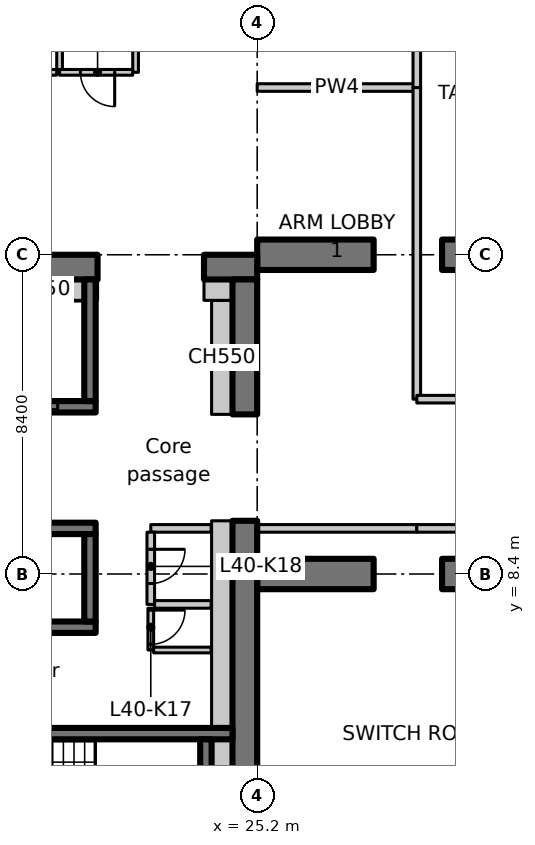
"""IFC4 building model, lengths in metres.
Left out: names, types, materials, properties, quantities, classifications, styles, units other than length and angle.
Written with IfcOpenShell. Run it as: python <this file> out.ifc"""

import sys

from ifc_helpers import new_model, si_unit, direction, frame, frame_2d, origin, place, context, subcontext, project, spatial, polyline, rectangle, outline, extrude, element, fill, save


model = new_model("IFC4")
c1 = context("Model", 3, precision=1e-05, world=origin(), true_north=direction((0.0, 1.0)))
c2 = subcontext(c1, "Body", "Model", "MODEL_VIEW")
j1 = project(units=[si_unit("LENGTHUNIT", "METRE"), si_unit("PLANEANGLEUNIT", "RADIAN")], contexts=[c1])
p1 = place(None, origin())
s1 = spatial("IfcSite", under=j1, at=p1, CompositionType="ELEMENT")
p2 = place(p1, origin())
s2 = spatial("IfcBuilding", under=s1, at=p2, CompositionType="ELEMENT")
p3 = place(p2, frame((0.0, 0.0, 162.0)))
s3 = spatial("IfcBuildingStorey", under=s2, at=p3, CompositionType="ELEMENT", Elevation=162.0)
for number, where, z_axis, x_axis in (
    (1, (25.2, 8.4, 0.0), (0.0, 0.0, 1.0), (1.0, 0.0, 0.0)),
    (2, (30.065, 8.4, 0.0), (0.0, 0.0, 1.0), (1.0, 0.0, 0.0)),
    (3, (25.2, 16.8, 0.0), (0.0, 0.0, 1.0), (1.0, 0.0, 0.0)),
    (4, (30.065, 16.8, 0.0), (0.0, 0.0, 1.0), (1.0, 0.0, 0.0)),
):
    element("IfcWall", number, at=place(p3, frame(where, z_axis=z_axis, x_axis=x_axis)), inside=s3, PredefinedType="SHEAR", context=c2, shape_type="SweptSolid", body=[
        extrude(rectangle(XDim=3.065, YDim=0.8, at=frame_2d((1.532, 0.0))), origin(), (0.0, 0.0, 1.0), 4.55),
    ])
p4 = place(p3, frame((-1.1, 16.475, 0.0), z_axis=(0.0, 0.0, 1.0), x_axis=(1.0, 0.0, 0.0)))
e5 = element("IfcWall", 5, at=p4, inside=s3, PredefinedType="SHEAR", context=c2, shape_type="SweptSolid", body=[
    extrude(rectangle(XDim=22.1, YDim=0.65, at=frame_2d((11.05, 0.0))), origin(), (0.0, 0.0, 1.0), 4.55),
])
p5 = place(p4, frame((3.15, 0.0, 0.0)))
e6 = element("IfcOpeningElement", 6, at=p5, cuts=e5, PredefinedType="OPENING", context=c2, shape_type="SweptSolid", body=[
    extrude(rectangle(XDim=1.1, YDim=2.3, at=frame_2d((0.55, 1.15))), frame((0.0, 0.335, 0.0), z_axis=(0.0, -1.0, 0.0), x_axis=(1.0, 0.0, 0.0)), (0.0, 0.0, 1.0), 0.67),
])
p6 = place(p3, frame((23.8, 16.475, 0.0), z_axis=(0.0, 0.0, 1.0), x_axis=(1.0, 0.0, 0.0)))
e7 = element("IfcWall", 7, at=p6, inside=s3, PredefinedType="SHEAR", context=c2, shape_type="SweptSolid", body=[
    extrude(rectangle(XDim=1.4, YDim=0.65, at=frame_2d((0.7, 0.0))), origin(), (0.0, 0.0, 1.0), 4.55),
])
p7 = place(p3, frame((24.875, 0.65, 0.0), z_axis=(0.0, 0.0, 1.0), x_axis=(0.0, 1.0, 0.0)))
e8 = element("IfcWall", 8, at=p7, inside=s3, PredefinedType="SHEAR", context=c2, shape_type="SweptSolid", body=[
    extrude(rectangle(XDim=9.15, YDim=0.65, at=frame_2d((4.575, 0.0))), origin(), (0.0, 0.0, 1.0), 4.55),
])
p8 = place(p3, frame((24.875, 12.6, 0.0), z_axis=(0.0, 0.0, 1.0), x_axis=(0.0, 1.0, 0.0)))
e9 = element("IfcWall", 9, at=p8, inside=s3, PredefinedType="SHEAR", context=c2, shape_type="SweptSolid", body=[
    extrude(rectangle(XDim=3.55, YDim=0.65, at=frame_2d((1.775, 0.0))), origin(), (0.0, 0.0, 1.0), 4.55),
])
p9 = place(p3, frame((24.275, 12.6, 0.0), z_axis=(0.0, 0.0, 1.0), x_axis=(0.0, 1.0, 0.0)))
e10 = element("IfcWall", 10, at=p9, inside=s3, PredefinedType="PARTITIONING", context=c2, shape_type="SweptSolid", body=[
    extrude(rectangle(XDim=3.0, YDim=0.55, at=frame_2d((1.5, 0.0))), origin(), (0.0, 0.0, 1.0), 4.55),
])
p10 = place(p3, frame((23.8, 15.875, 0.0), z_axis=(0.0, 0.0, 1.0), x_axis=(1.0, 0.0, 0.0)))
e11 = element("IfcWall", 11, at=p10, inside=s3, PredefinedType="PARTITIONING", context=c2, shape_type="SweptSolid", body=[
    extrude(rectangle(XDim=0.75, YDim=0.55, at=frame_2d((0.375, 0.0))), origin(), (0.0, 0.0, 1.0), 4.55),
])
for number, where, z_axis, x_axis in (
    (12, (0.65, 7.0, 0.0), (0.0, 0.0, 1.0), (1.0, 0.0, 0.0)),
    (13, (0.65, 9.6, 0.0), (0.0, 0.0, 1.0), (1.0, 0.0, 0.0)),
):
    element("IfcWall", number, at=place(p3, frame(where, z_axis=z_axis, x_axis=x_axis)), inside=s3, PredefinedType="SHEAR", context=c2, shape_type="SweptSolid", body=[
        extrude(rectangle(XDim=20.3, YDim=0.3, at=frame_2d((10.15, 0.0))), origin(), (0.0, 0.0, 1.0), 4.55),
    ])
p11 = place(p3, frame((20.8, 7.15, 0.0), z_axis=(0.0, 0.0, 1.0), x_axis=(0.0, 1.0, 0.0)))
e14 = element("IfcWall", 14, at=p11, inside=s3, PredefinedType="SHEAR", context=c2, shape_type="SweptSolid", body=[
    extrude(rectangle(XDim=2.3, YDim=0.3, at=frame_2d((1.15, 0.0))), origin(), (0.0, 0.0, 1.0), 4.55),
])
p12 = place(p3, frame((0.65, 12.8, 0.0), z_axis=(0.0, 0.0, 1.0), x_axis=(1.0, 0.0, 0.0)))
e15 = element("IfcWall", 15, at=p12, inside=s3, PredefinedType="SHEAR", context=c2, shape_type="SweptSolid", body=[
    extrude(rectangle(XDim=20.3, YDim=0.3, at=frame_2d((10.15, 0.0))), origin(), (0.0, 0.0, 1.0), 4.55),
])
p13 = place(p12, frame((4.2, 0.0, 0.0)))
e16 = element("IfcOpeningElement", 16, at=p13, cuts=e15, PredefinedType="OPENING", context=c2, shape_type="SweptSolid", body=[
    extrude(rectangle(XDim=1.1, YDim=2.3, at=frame_2d((0.55, 1.15))), frame((0.0, 0.16, 0.0), z_axis=(0.0, -1.0, 0.0), x_axis=(1.0, 0.0, 0.0)), (0.0, 0.0, 1.0), 0.32),
])
p14 = place(p12, frame((7.0, 0.0, 0.0)))
e17 = element("IfcOpeningElement", 17, at=p14, cuts=e15, PredefinedType="OPENING", context=c2, shape_type="SweptSolid", body=[
    extrude(rectangle(XDim=1.1, YDim=2.3, at=frame_2d((0.55, 1.15))), frame((0.0, 0.16, 0.0), z_axis=(0.0, -1.0, 0.0), x_axis=(1.0, 0.0, 0.0)), (0.0, 0.0, 1.0), 0.32),
])
p15 = place(p12, frame((9.8, 0.0, 0.0)))
e18 = element("IfcOpeningElement", 18, at=p15, cuts=e15, PredefinedType="OPENING", context=c2, shape_type="SweptSolid", body=[
    extrude(rectangle(XDim=1.1, YDim=2.3, at=frame_2d((0.55, 1.15))), frame((0.0, 0.16, 0.0), z_axis=(0.0, -1.0, 0.0), x_axis=(1.0, 0.0, 0.0)), (0.0, 0.0, 1.0), 0.32),
])
p16 = place(p12, frame((12.6, 0.0, 0.0)))
e19 = element("IfcOpeningElement", 19, at=p16, cuts=e15, PredefinedType="OPENING", context=c2, shape_type="SweptSolid", body=[
    extrude(rectangle(XDim=1.1, YDim=2.3, at=frame_2d((0.55, 1.15))), frame((0.0, 0.16, 0.0), z_axis=(0.0, -1.0, 0.0), x_axis=(1.0, 0.0, 0.0)), (0.0, 0.0, 1.0), 0.32),
])
p17 = place(p12, frame((18.2, 0.0, 0.0)))
e20 = element("IfcOpeningElement", 20, at=p17, cuts=e15, PredefinedType="OPENING", context=c2, shape_type="SweptSolid", body=[
    extrude(rectangle(XDim=1.1, YDim=2.3, at=frame_2d((0.55, 1.15))), frame((0.0, 0.16, 0.0), z_axis=(0.0, -1.0, 0.0), x_axis=(1.0, 0.0, 0.0)), (0.0, 0.0, 1.0), 0.32),
])
p18 = place(p3, frame((20.8, 12.95, 0.0), z_axis=(0.0, 0.0, 1.0), x_axis=(0.0, 1.0, 0.0)))
e21 = element("IfcWall", 21, at=p18, inside=s3, PredefinedType="SHEAR", context=c2, shape_type="SweptSolid", body=[
    extrude(rectangle(XDim=3.2, YDim=0.3, at=frame_2d((1.6, 0.0))), origin(), (0.0, 0.0, 1.0), 4.55),
])
p19 = place(p3, frame((15.8, 4.2, 0.0), z_axis=(0.0, 0.0, 1.0), x_axis=(1.0, 0.0, 0.0)))
e22 = element("IfcWall", 22, at=p19, inside=s3, PredefinedType="SHEAR", context=c2, shape_type="SweptSolid", body=[
    extrude(rectangle(XDim=8.75, YDim=0.3, at=frame_2d((4.375, 0.0))), origin(), (0.0, 0.0, 1.0), 4.55),
])
p20 = place(p19, frame((0.4, 0.0, 0.0)))
e23 = element("IfcOpeningElement", 23, at=p20, cuts=e22, PredefinedType="OPENING", context=c2, shape_type="SweptSolid", body=[
    extrude(rectangle(XDim=1.0, YDim=2.1, at=frame_2d((0.5, 1.05))), frame((0.0, 0.16, 0.0), z_axis=(0.0, -1.0, 0.0), x_axis=(1.0, 0.0, 0.0)), (0.0, 0.0, 1.0), 0.32),
])
p21 = place(p3, frame((23.85, 1.5, 0.0), z_axis=(0.0, 0.0, 1.0), x_axis=(0.0, 1.0, 0.0)))
e24 = element("IfcWall", 24, at=p21, inside=s3, PredefinedType="SHEAR", context=c2, shape_type="SweptSolid", body=[
    extrude(rectangle(XDim=2.55, YDim=0.3, at=frame_2d((1.275, 0.0))), origin(), (0.0, 0.0, 1.0), 4.55),
])
p22 = place(p3, frame((23.988, 9.6, 0.0), z_axis=(0.0, 0.0, 1.0), x_axis=(-1.0, 0.0, 0.0)))
e25 = element("IfcWall", 25, at=p22, inside=s3, PredefinedType="PARTITIONING", context=c2, shape_type="SweptSolid", body=[
    extrude(rectangle(XDim=1.588, YDim=0.2, at=frame_2d((0.794, 0.0))), origin(), (0.0, 0.0, 1.0), 4.55),
])
p23 = place(p3, frame((22.4, 9.5, 0.0), z_axis=(0.0, 0.0, 1.0), x_axis=(0.0, -1.0, 0.0)))
e26 = element("IfcWall", 26, at=p23, inside=s3, PredefinedType="PARTITIONING", context=c2, shape_type="SweptSolid", body=[
    extrude(rectangle(XDim=1.9, YDim=0.2, at=frame_2d((0.95, 0.0))), origin(), (0.0, 0.0, 1.0), 4.55),
])
p24 = place(p23, frame((0.45, 0.0, 0.0)))
e27 = element("IfcOpeningElement", 27, at=p24, cuts=e26, PredefinedType="OPENING", context=c2, shape_type="SweptSolid", body=[
    extrude(rectangle(XDim=0.9, YDim=2.1, at=frame_2d((0.45, 1.05))), frame((0.0, 0.11, 0.0), z_axis=(0.0, -1.0, 0.0), x_axis=(1.0, 0.0, 0.0)), (0.0, 0.0, 1.0), 0.22),
])
p25 = place(p3, frame((22.5, 7.6, 0.0), z_axis=(0.0, 0.0, 1.0), x_axis=(1.0, 0.0, 0.0)))
e28 = element("IfcWall", 28, at=p25, inside=s3, PredefinedType="PARTITIONING", context=c2, shape_type="SweptSolid", body=[
    extrude(rectangle(XDim=1.488, YDim=0.2, at=frame_2d((0.744, 0.0))), origin(), (0.0, 0.0, 1.0), 4.55),
])
p26 = place(p3, frame((22.0, 23.925, 0.0), z_axis=(0.0, 0.0, 1.0), x_axis=(0.0, -1.0, 0.0)))
e29 = element("IfcWall", 29, at=p26, inside=s3, PredefinedType="PARTITIONING", context=c2, shape_type="SweptSolid", body=[
    extrude(rectangle(XDim=2.325, YDim=0.15, at=frame_2d((1.163, 0.0))), origin(), (0.0, 0.0, 1.0), 4.55),
])
p27 = place(p3, frame((21.925, 21.6, 0.0), z_axis=(0.0, 0.0, 1.0), x_axis=(-1.0, 0.0, 0.0)))
e30 = element("IfcWall", 30, at=p27, inside=s3, PredefinedType="PARTITIONING", context=c2, shape_type="SweptSolid", body=[
    extrude(rectangle(XDim=1.925, YDim=0.15, at=frame_2d((0.962, 0.0))), origin(), (0.0, 0.0, 1.0), 4.55),
])
p28 = place(p27, frame((0.475, 0.0, 0.0)))
e31 = element("IfcOpeningElement", 31, at=p28, cuts=e30, PredefinedType="OPENING", context=c2, shape_type="SweptSolid", body=[
    extrude(rectangle(XDim=0.9, YDim=2.1, at=frame_2d((0.45, 1.05))), frame((0.0, 0.085, 0.0), z_axis=(0.0, -1.0, 0.0), x_axis=(1.0, 0.0, 0.0)), (0.0, 0.0, 1.0), 0.17),
])
p29 = place(p3, frame((20.0, 21.675, 0.0), z_axis=(0.0, 0.0, 1.0), x_axis=(0.0, 1.0, 0.0)))
e32 = element("IfcWall", 32, at=p29, inside=s3, PredefinedType="PARTITIONING", context=c2, shape_type="SweptSolid", body=[
    extrude(rectangle(XDim=2.25, YDim=0.15, at=frame_2d((1.125, 0.0))), origin(), (0.0, 0.0, 1.0), 4.55),
])
p30 = place(p3, frame((19.925, 21.6, 0.0), z_axis=(0.0, 0.0, 1.0), x_axis=(-1.0, 0.0, 0.0)))
e33 = element("IfcWall", 33, at=p30, inside=s3, PredefinedType="PARTITIONING", context=c2, shape_type="SweptSolid", body=[
    extrude(rectangle(XDim=2.325, YDim=0.15, at=frame_2d((1.163, 0.0))), origin(), (0.0, 0.0, 1.0), 4.55),
])
p31 = place(p30, frame((0.675, 0.0, 0.0)))
e34 = element("IfcOpeningElement", 34, at=p31, cuts=e33, PredefinedType="OPENING", context=c2, shape_type="SweptSolid", body=[
    extrude(rectangle(XDim=0.9, YDim=2.1, at=frame_2d((0.45, 1.05))), frame((0.0, 0.085, 0.0), z_axis=(0.0, -1.0, 0.0), x_axis=(1.0, 0.0, 0.0)), (0.0, 0.0, 1.0), 0.17),
])
p32 = place(p3, frame((22.4, 7.5, 0.0), z_axis=(0.0, 0.0, 1.0), x_axis=(0.0, -1.0, 0.0)))
e35 = element("IfcWall", 35, at=p32, inside=s3, PredefinedType="PARTITIONING", context=c2, shape_type="SweptSolid", body=[
    extrude(rectangle(XDim=1.1, YDim=0.15, at=frame_2d((0.55, 0.0))), origin(), (0.0, 0.0, 1.0), 4.55),
])
p33 = place(p32, frame((0.05, 0.0, 0.0)))
e36 = element("IfcOpeningElement", 36, at=p33, cuts=e35, PredefinedType="OPENING", context=c2, shape_type="SweptSolid", body=[
    extrude(rectangle(XDim=0.9, YDim=2.1, at=frame_2d((0.45, 1.05))), frame((0.0, 0.085, 0.0), z_axis=(0.0, -1.0, 0.0), x_axis=(1.0, 0.0, 0.0)), (0.0, 0.0, 1.0), 0.17),
])
p34 = place(p3, frame((22.475, 6.4, 0.0), z_axis=(0.0, 0.0, 1.0), x_axis=(1.0, 0.0, 0.0)))
e37 = element("IfcWall", 37, at=p34, inside=s3, PredefinedType="PARTITIONING", context=c2, shape_type="SweptSolid", body=[
    extrude(rectangle(XDim=1.513, YDim=0.15, at=frame_2d((0.756, 0.0))), origin(), (0.0, 0.0, 1.0), 4.55),
])
p35 = place(p3, frame((18.15, 15.875, 0.0), z_axis=(0.0, 0.0, 1.0), x_axis=(1.0, 0.0, 0.0)))
e38 = element("IfcWall", 38, at=p35, inside=s3, PredefinedType="PARTITIONING", context=c2, shape_type="SweptSolid", body=[
    extrude(rectangle(XDim=2.5, YDim=0.55, at=frame_2d((1.25, 0.0))), origin(), (0.0, 0.0, 1.0), 4.55),
])
p36 = place(p3, frame((20.95, 15.875, 0.0), z_axis=(0.0, 0.0, 1.0), x_axis=(1.0, 0.0, 0.0)))
e39 = element("IfcWall", 39, at=p36, inside=s3, PredefinedType="PARTITIONING", context=c2, shape_type="SweptSolid", body=[
    extrude(rectangle(XDim=0.05, YDim=0.55, at=frame_2d((0.025, 0.0))), origin(), (0.0, 0.0, 1.0), 4.55),
])
p37 = place(p3, frame((24.275, 1.5, 0.0), z_axis=(0.0, 0.0, 1.0), x_axis=(0.0, 1.0, 0.0)))
e40 = element("IfcWall", 40, at=p37, inside=s3, PredefinedType="PARTITIONING", context=c2, shape_type="SweptSolid", body=[
    extrude(rectangle(XDim=2.55, YDim=0.55, at=frame_2d((1.275, 0.0))), origin(), (0.0, 0.0, 1.0), 4.55),
])
p38 = place(p3, frame((24.275, 4.35, 0.0), z_axis=(0.0, 0.0, 1.0), x_axis=(0.0, 1.0, 0.0)))
e41 = element("IfcWall", 41, at=p38, inside=s3, PredefinedType="PARTITIONING", context=c2, shape_type="SweptSolid", body=[
    extrude(rectangle(XDim=5.45, YDim=0.55, at=frame_2d((2.725, 0.0))), origin(), (0.0, 0.0, 1.0), 4.55),
])
for number, where, z_axis, x_axis in (
    (42, (25.2, 21.2, 0.0), (0.0, 0.0, 1.0), (1.0, 0.0, 0.0)),
    (43, (29.4, 9.6, 0.0), (0.0, 0.0, 1.0), (-1.0, 0.0, 0.0)),
):
    element("IfcWall", number, at=place(p3, frame(where, z_axis=z_axis, x_axis=x_axis)), inside=s3, PredefinedType="PARTITIONING", context=c2, shape_type="SweptSolid", body=[
        extrude(rectangle(XDim=4.2, YDim=0.2, at=frame_2d((2.1, 0.0))), origin(), (0.0, 0.0, 1.0), 4.53),
    ])
p39 = place(p3, frame((29.4, 21.2, 0.0), z_axis=(0.0, 0.0, 1.0), x_axis=(0.0, -1.0, 0.0)))
e44 = element("IfcWall", 44, at=p39, inside=s3, PredefinedType="PARTITIONING", context=c2, shape_type="SweptSolid", body=[
    extrude(rectangle(XDim=8.2, YDim=0.2, at=frame_2d((4.1, 0.0))), origin(), (0.0, 0.0, 1.0), 4.53),
])
p40 = place(p3, frame((29.4, 27.436, 0.0), z_axis=(0.0, 0.0, 1.0), x_axis=(0.0, -1.0, 0.0)))
e45 = element("IfcWall", 45, at=p40, inside=s3, PredefinedType="PARTITIONING", context=c2, shape_type="SweptSolid", body=[
    extrude(outline(polyline([(0.0, 0.0), (6.236, 0.0), (6.236, 4.53), (2.686, 4.53), (2.684, 4.18), (1.788, 4.18), (1.786, 4.53), (0.161, 4.53), (0.0, 4.53), (0.0, 0.0)])), frame((0.0, 0.1, 0.0), z_axis=(0.0, -1.0, 0.0), x_axis=(1.0, 0.0, 0.0)), (0.0, 0.0, 1.0), 0.2),
])
for number, where, z_axis, x_axis in (
    (46, (33.6, 9.6, 0.0), (0.0, 0.0, 1.0), (-1.0, 0.0, 0.0)),
    (47, (29.4, 13.0, 0.0), (0.0, 0.0, 1.0), (1.0, 0.0, 0.0)),
):
    element("IfcWall", number, at=place(p3, frame(where, z_axis=z_axis, x_axis=x_axis)), inside=s3, PredefinedType="PARTITIONING", context=c2, shape_type="SweptSolid", body=[
        extrude(rectangle(XDim=4.2, YDim=0.2, at=frame_2d((2.1, 0.0))), origin(), (0.0, 0.0, 1.0), 4.53),
    ])
p41 = place(p17, origin())
e48 = element("IfcDoor", 48, at=p41, inside=s3, OperationType="SLIDING_TO_LEFT", PredefinedType="DOOR", context=c2, shape_type="SweptSolid", body=[
    extrude(rectangle(XDim=1.1, YDim=2.3, at=frame_2d((0.55, 1.15))), frame((0.0, 0.025, 0.0), z_axis=(0.0, -1.0, 0.0), x_axis=(1.0, 0.0, 0.0)), (0.0, 0.0, 1.0), 0.05),
])
fill(e20, e48)
p42 = place(p33, origin())
e49 = element("IfcDoor", 49, at=p42, inside=s3, OperationType="SINGLE_SWING_LEFT", PredefinedType="DOOR", context=c2, shape_type="SweptSolid", body=[
    extrude(rectangle(XDim=0.9, YDim=2.1, at=frame_2d((0.45, 1.05))), frame((0.0, 0.025, 0.0), z_axis=(0.0, -1.0, 0.0), x_axis=(1.0, 0.0, 0.0)), (0.0, 0.0, 1.0), 0.05),
])
fill(e36, e49)
p43 = place(p24, origin())
e50 = element("IfcDoor", 50, at=p43, inside=s3, OperationType="SINGLE_SWING_RIGHT", PredefinedType="DOOR", context=c2, shape_type="SweptSolid", body=[
    extrude(rectangle(XDim=0.9, YDim=2.1, at=frame_2d((0.45, 1.05))), frame((0.0, 0.025, 0.0), z_axis=(0.0, -1.0, 0.0), x_axis=(1.0, 0.0, 0.0)), (0.0, 0.0, 1.0), 0.05),
])
fill(e27, e50)
p44 = place(p28, origin())
e51 = element("IfcDoor", 51, at=p44, inside=s3, OperationType="SINGLE_SWING_RIGHT", PredefinedType="DOOR", context=c2, shape_type="SweptSolid", body=[
    extrude(rectangle(XDim=0.9, YDim=2.1, at=frame_2d((0.45, 1.05))), frame((0.0, 0.025, 0.0), z_axis=(0.0, -1.0, 0.0), x_axis=(1.0, 0.0, 0.0)), (0.0, 0.0, 1.0), 0.05),
])
fill(e31, e51)
save(model, sys.argv[1])
